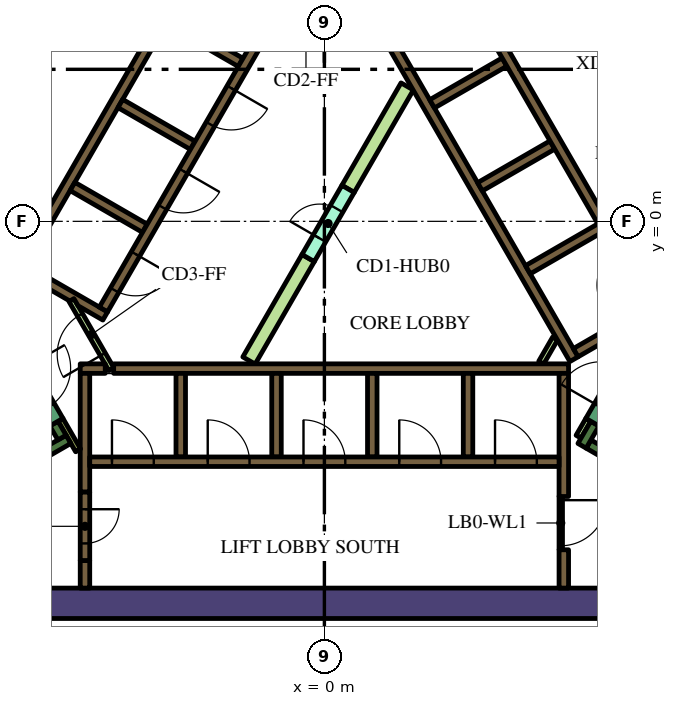
"""IFC4 building model, lengths in metres.
Left out: names, types, materials, properties, quantities, classifications, styles, units other than length and angle.
Written with IfcOpenShell. Run it as: python <this file> out.ifc"""

import sys

from ifc_helpers import new_model, si_unit, direction, frame, frame_2d, origin, place, context, subcontext, project, spatial, polyline, rectangle, outline, extrude, element, fill, save


model = new_model("IFC4")
c1 = context("Model", 3, precision=1e-05, world=origin(), true_north=direction((0.0, 1.0)))
c2 = subcontext(c1, "Body", "Model", "MODEL_VIEW")
j1 = project(units=[si_unit("LENGTHUNIT", "METRE"), si_unit("PLANEANGLEUNIT", "RADIAN")], contexts=[c1])
p1 = place(None, origin())
s1 = spatial("IfcSite", under=j1, at=p1, CompositionType="ELEMENT")
p2 = place(p1, origin())
s2 = spatial("IfcBuilding", under=s1, at=p2, CompositionType="ELEMENT")
p3 = place(p2, frame((0.0, 0.0, 179.4)))
s3 = spatial("IfcBuildingStorey", under=s2, at=p3, CompositionType="ELEMENT", Elevation=179.4)
p4 = place(p3, frame((-13.378, -10.05, 0.0), z_axis=(0.0, 0.0, 1.0), x_axis=(1.0, 0.0, 0.0)))
e1 = element("IfcWall", 1, at=p4, inside=s3, PredefinedType="SOLIDWALL", context=c2, shape_type="SweptSolid", body=[
    extrude(rectangle(XDim=22.282, YDim=0.8, at=frame_2d((11.141, 0.0))), origin(), (0.0, 0.0, 1.0), 4.2),
])
p5 = place(p3, frame((-12.668, -1.842, 0.0), z_axis=(0.0, 0.0, 1.0), x_axis=(0.500003640647, 0.866023301845, 0.0)))
e2 = element("IfcWall", 2, at=p5, inside=s3, PredefinedType="SOLIDWALL", context=c2, shape_type="SweptSolid", body=[
    extrude(rectangle(XDim=15.858, YDim=0.8, at=frame_2d((7.929, 0.0))), origin(), (0.0, 0.0, 1.0), 4.2),
])
p6 = place(p3, frame((12.84, -9.261, 0.0), z_axis=(0.0, 0.0, 1.0), x_axis=(-0.866013990052, 0.500019768644, 0.0)))
e3 = element("IfcWall", 3, at=p6, inside=s3, PredefinedType="SOLIDWALL", context=c2, shape_type="SweptSolid", body=[
    extrude(rectangle(XDim=6.8, YDim=0.25, at=frame_2d((3.4, 0.0))), origin(), (0.0, 0.0, 1.0), 4.2),
])
p7 = place(p3, frame((6.78, -5.906, 0.0), z_axis=(0.0, 0.0, 1.0), x_axis=(0.500223362819, 0.865896406789, 0.0)))
e4 = element("IfcWall", 4, at=p7, inside=s3, PredefinedType="SOLIDWALL", context=c2, shape_type="SweptSolid", body=[
    extrude(rectangle(XDim=0.675, YDim=0.25, at=frame_2d((0.337, 0.0))), origin(), (0.0, 0.0, 1.0), 4.2),
])
p8 = place(p3, frame((-12.84, -9.261, 0.0), z_axis=(0.0, 0.0, 1.0), x_axis=(0.866016039709, 0.500016218704, 0.0)))
e5 = element("IfcWall", 5, at=p8, inside=s3, PredefinedType="SOLIDWALL", context=c2, shape_type="SweptSolid", body=[
    extrude(rectangle(XDim=7.05, YDim=0.25, at=frame_2d((3.525, 0.0))), origin(), (0.0, 0.0, 1.0), 4.2),
])
p9 = place(p3, frame((-6.905, -5.69, 0.0), z_axis=(0.0, 0.0, 1.0), x_axis=(-0.500402024738, 0.865793170242, 0.0)))
e6 = element("IfcWall", 6, at=p9, inside=s3, PredefinedType="SOLIDWALL", context=c2, shape_type="SweptSolid", body=[
    extrude(rectangle(XDim=0.425, YDim=0.25, at=frame_2d((0.212, 0.0))), origin(), (0.0, 0.0, 1.0), 4.2),
])
p10 = place(p3, frame((-6.3, -8.925, 0.0), z_axis=(0.0, 0.0, 1.0), x_axis=(0.0, -1.0, 0.0)))
e7 = element("IfcWall", 7, at=p10, inside=s3, PredefinedType="SOLIDWALL", context=c2, shape_type="SweptSolid", body=[
    extrude(rectangle(XDim=0.725, YDim=0.25, at=frame_2d((0.363, 0.0))), origin(), (0.0, 0.0, 1.0), 4.2),
])
p11 = place(p3, frame((-5.545, -3.875, 0.0), z_axis=(0.0, 0.0, 1.0), x_axis=(1.0, 0.0, 0.0)))
e8 = element("IfcWall", 8, at=p11, inside=s3, PredefinedType="SOLIDWALL", context=c2, shape_type="SweptSolid", body=[
    extrude(rectangle(XDim=11.97, YDim=0.25, at=frame_2d((5.985, 0.0))), origin(), (0.0, 0.0, 1.0), 4.2),
])
p12 = place(p3, frame((-6.425, -3.875, 0.0), z_axis=(0.0, 0.0, 1.0), x_axis=(1.0, 0.0, 0.0)))
e9 = element("IfcWall", 9, at=p12, inside=s3, PredefinedType="SOLIDWALL", context=c2, shape_type="SweptSolid", body=[
    extrude(rectangle(XDim=0.658, YDim=0.25, at=frame_2d((0.329, 0.0))), origin(), (0.0, 0.0, 1.0), 4.2),
])
p13 = place(p3, frame((6.3, -7.24, 0.0), z_axis=(0.0, 0.0, 1.0), x_axis=(0.0, 1.0, 0.0)))
e10 = element("IfcWall", 10, at=p13, inside=s3, PredefinedType="SOLIDWALL", context=c2, shape_type="SweptSolid", body=[
    extrude(rectangle(XDim=3.24, YDim=0.25, at=frame_2d((1.62, 0.0))), origin(), (0.0, 0.0, 1.0), 4.2),
])
p14 = place(p3, frame((6.3, -9.65, 0.0), z_axis=(0.0, 0.0, 1.0), x_axis=(0.0, 1.0, 0.0)))
e11 = element("IfcWall", 11, at=p14, inside=s3, PredefinedType="SOLIDWALL", context=c2, shape_type="SweptSolid", body=[
    extrude(rectangle(XDim=1.008, YDim=0.25, at=frame_2d((0.504, 0.0))), origin(), (0.0, 0.0, 1.0), 4.2),
])
for number, where, z_axis, x_axis in (
    (12, (3.78, -4.0, 0.0), (0.0, 0.0, 1.0), (0.0, -1.0, 0.0)),
    (13, (1.26, -4.0, 0.0), (0.0, 0.0, 1.0), (0.0, -1.0, 0.0)),
    (14, (-1.26, -4.0, 0.0), (0.0, 0.0, 1.0), (0.0, -1.0, 0.0)),
    (15, (-3.78, -4.0, 0.0), (0.0, 0.0, 1.0), (0.0, -1.0, 0.0)),
):
    element("IfcWall", number, at=place(p3, frame(where, z_axis=z_axis, x_axis=x_axis)), inside=s3, PredefinedType="SOLIDWALL", context=c2, shape_type="SweptSolid", body=[
        extrude(rectangle(XDim=2.2, YDim=0.25, at=frame_2d((1.1, 0.0))), origin(), (0.0, 0.0, 1.0), 4.2),
    ])
p15 = place(p3, frame((-6.3, -7.125, 0.0), z_axis=(0.0, 0.0, 1.0), x_axis=(0.0, 1.0, 0.0)))
e16 = element("IfcWall", 16, at=p15, inside=s3, PredefinedType="SOLIDWALL", context=c2, shape_type="SweptSolid", body=[
    extrude(rectangle(XDim=3.125, YDim=0.25, at=frame_2d((1.562, 0.0))), origin(), (0.0, 0.0, 1.0), 4.2),
])
p16 = place(p3, frame((6.568, -3.627, 0.0), z_axis=(0.0, 0.0, 1.0), x_axis=(-0.499999455981, 0.866025717874, 0.0)))
e17 = element("IfcWall", 17, at=p16, inside=s3, PredefinedType="SOLIDWALL", context=c2, shape_type="SweptSolid", body=[
    extrude(rectangle(XDim=11.978, YDim=0.25, at=frame_2d((5.989, 0.0))), origin(), (0.0, 0.0, 1.0), 4.2),
])
for number, where, z_axis, x_axis in (
    (18, (2.834, 3.091, 0.0), (0.0, 0.0, 1.0), (0.866, 0.5, 0.0)),
    (19, (4.094, 0.909, 0.0), (0.0, 0.0, 1.0), (0.866, 0.5, 0.0)),
    (20, (5.354, -1.274, 0.0), (0.0, 0.0, 1.0), (0.866, 0.5, 0.0)),
):
    element("IfcWall", number, at=place(p3, frame(where, z_axis=z_axis, x_axis=x_axis)), inside=s3, PredefinedType="SOLIDWALL", context=c2, shape_type="SweptSolid", body=[
        extrude(rectangle(XDim=2.2, YDim=0.25, at=frame_2d((1.1, 0.0))), origin(), (0.0, 0.0, 1.0), 4.2),
    ])
p17 = place(p3, frame((6.614, -3.456, 0.0), z_axis=(0.0, 0.0, 1.0), x_axis=(0.866032512851, 0.499987686533, 0.0)))
e21 = element("IfcWall", 21, at=p17, inside=s3, PredefinedType="SOLIDWALL", context=c2, shape_type="SweptSolid", body=[
    extrude(rectangle(XDim=2.975, YDim=0.25, at=frame_2d((1.487, 0.0))), origin(), (0.0, 0.0, 1.0), 4.2),
])
p18 = place(p3, frame((-8.06, -1.311, 0.0), z_axis=(0.0, 0.0, 1.0), x_axis=(0.50000273126, 0.866023826885, 0.0)))
e22 = element("IfcWall", 22, at=p18, inside=s3, PredefinedType="SOLIDWALL", context=c2, shape_type="SweptSolid", body=[
    extrude(rectangle(XDim=10.33, YDim=0.25, at=frame_2d((5.165, 0.0))), origin(), (0.0, 0.0, 1.0), 4.2),
])
for number, where, z_axis, x_axis in (
    (23, (-2.204, 4.182, 0.0), (0.0, 0.0, 1.0), (-0.866, 0.5, 0.0)),
    (24, (-5.369, 3.1, 0.0), (0.0, 0.0, 1.0), (0.866, -0.5, 0.0)),
    (25, (-4.724, -0.182, 0.0), (0.0, 0.0, 1.0), (-0.866, 0.5, 0.0)),
):
    element("IfcWall", number, at=place(p3, frame(where, z_axis=z_axis, x_axis=x_axis)), inside=s3, PredefinedType="SOLIDWALL", context=c2, shape_type="SweptSolid", body=[
        extrude(rectangle(XDim=2.2, YDim=0.25, at=frame_2d((1.1, 0.0))), origin(), (0.0, 0.0, 1.0), 4.2),
    ])
p19 = place(p3, origin())
e26 = element("IfcWall", 26, at=p19, inside=s3, PredefinedType="SOLIDWALL", context=c2, shape_type="SweptSolid", body=[
    extrude(outline(polyline([(-5.922, -2.257), (-5.922, -2.257), (-5.705, -2.382), (-5.83, -2.598), (-6.483, -2.221), (-6.591, -2.033), (-6.591, -2.033), (-6.7, -2.096), (-7.952, -1.373), (-7.827, -1.156), (-5.922, -2.257)])), origin(), (0.0, 0.0, 1.0), 4.2),
])
p20 = place(p3, frame((-6.48, -6.027, 0.0), z_axis=(0.0, 0.0, 1.0), x_axis=(-0.499927229454, 0.866067413802, 0.0)))
e27 = element("IfcWall", 27, at=p20, inside=s3, PredefinedType="PARTITIONING", context=c2, shape_type="SweptSolid", body=[
    extrude(rectangle(XDim=0.929, YDim=0.15, at=frame_2d((0.464, 0.0))), origin(), (0.0, 0.0, 1.0), 4.2),
])
p21 = place(p3, frame((6.945, -5.222, 0.0), z_axis=(0.0, 0.0, 1.0), x_axis=(-0.499818422106, -0.866130212453, 0.0)))
e28 = element("IfcWall", 28, at=p21, inside=s3, PredefinedType="PARTITIONING", context=c2, shape_type="SweptSolid", body=[
    extrude(rectangle(XDim=0.514, YDim=0.15, at=frame_2d((0.257, 0.0))), origin(), (0.0, 0.0, 1.0), 3.15),
])
p22 = place(p3, frame((5.705, -3.718, 0.0), z_axis=(0.0, 0.0, 1.0), x_axis=(0.499962090823, 0.866047289552, 0.0)))
e29 = element("IfcWall", 29, at=p22, inside=s3, PredefinedType="PARTITIONING", context=c2, shape_type="SweptSolid", body=[
    extrude(rectangle(XDim=0.735, YDim=0.15, at=frame_2d((0.367, 0.0))), origin(), (0.0, 0.0, 1.0), 3.15),
])
e30 = element("IfcWall", 30, at=p19, inside=s3, PredefinedType="PARTITIONING", context=c2, shape_type="SweptSolid", body=[
    extrude(outline(polyline([(2.017, 3.643), (2.342, 3.456), (0.785, 0.76), (0.46, 0.947), (2.017, 3.643)])), origin(), (0.0, 0.0, 1.0), 3.15),
])
e31 = element("IfcWall", 31, at=p19, inside=s3, PredefinedType="PARTITIONING", context=c2, shape_type="SweptSolid", body=[
    extrude(outline(polyline([(-0.59, -0.872), (-0.265, -1.059), (-1.822, -3.756), (-2.147, -3.568), (-0.59, -0.872)])), origin(), (0.0, 0.0, 1.0), 3.15),
])
p23 = place(p3, frame((-6.175, -6.325, 0.0), z_axis=(0.0, 0.0, 1.0), x_axis=(1.0, 0.0, 0.0)))
e32 = element("IfcWall", 32, at=p23, inside=s3, PredefinedType="SOLIDWALL", context=c2, shape_type="SweptSolid", body=[
    extrude(rectangle(XDim=12.35, YDim=0.25, at=frame_2d((6.175, 0.0))), origin(), (0.0, 0.0, 1.0), 4.2),
])
p24 = place(p23, frame((0.585, 0.0, 0.0)))
e33 = element("IfcOpeningElement", 33, at=p24, cuts=e32, PredefinedType="OPENING", context=c2, shape_type="SweptSolid", body=[
    extrude(rectangle(XDim=1.1, YDim=2.1, at=frame_2d((0.55, 1.05))), frame((0.0, 0.135, 0.0), z_axis=(0.0, -1.0, 0.0), x_axis=(1.0, 0.0, 0.0)), (0.0, 0.0, 1.0), 0.27),
])
p25 = place(p23, frame((3.105, 0.0, 0.0)))
e34 = element("IfcOpeningElement", 34, at=p25, cuts=e32, PredefinedType="OPENING", context=c2, shape_type="SweptSolid", body=[
    extrude(rectangle(XDim=1.1, YDim=2.1, at=frame_2d((0.55, 1.05))), frame((0.0, 0.135, 0.0), z_axis=(0.0, -1.0, 0.0), x_axis=(1.0, 0.0, 0.0)), (0.0, 0.0, 1.0), 0.27),
])
p26 = place(p23, frame((5.625, 0.0, 0.0)))
e35 = element("IfcOpeningElement", 35, at=p26, cuts=e32, PredefinedType="OPENING", context=c2, shape_type="SweptSolid", body=[
    extrude(rectangle(XDim=1.1, YDim=2.1, at=frame_2d((0.55, 1.05))), frame((0.0, 0.135, 0.0), z_axis=(0.0, -1.0, 0.0), x_axis=(1.0, 0.0, 0.0)), (0.0, 0.0, 1.0), 0.27),
])
p27 = place(p23, frame((8.145, 0.0, 0.0)))
e36 = element("IfcOpeningElement", 36, at=p27, cuts=e32, PredefinedType="OPENING", context=c2, shape_type="SweptSolid", body=[
    extrude(rectangle(XDim=1.1, YDim=2.1, at=frame_2d((0.55, 1.05))), frame((0.0, 0.135, 0.0), z_axis=(0.0, -1.0, 0.0), x_axis=(1.0, 0.0, 0.0)), (0.0, 0.0, 1.0), 0.27),
])
p28 = place(p23, frame((10.665, 0.0, 0.0)))
e37 = element("IfcOpeningElement", 37, at=p28, cuts=e32, PredefinedType="OPENING", context=c2, shape_type="SweptSolid", body=[
    extrude(rectangle(XDim=1.1, YDim=2.1, at=frame_2d((0.55, 1.05))), frame((0.0, 0.135, 0.0), z_axis=(0.0, -1.0, 0.0), x_axis=(1.0, 0.0, 0.0)), (0.0, 0.0, 1.0), 0.27),
])
p29 = place(p3, frame((8.565, -2.185, 0.0), z_axis=(0.0, 0.0, 1.0), x_axis=(-0.499997954832, 0.866026584559, 0.0)))
e38 = element("IfcWall", 38, at=p29, inside=s3, PredefinedType="SOLIDWALL", context=c2, shape_type="SweptSolid", body=[
    extrude(rectangle(XDim=12.35, YDim=0.25, at=frame_2d((6.175, 0.0))), origin(), (0.0, 0.0, 1.0), 4.2),
])
p30 = place(p29, frame((0.585, 0.0, 0.0)))
e39 = element("IfcOpeningElement", 39, at=p30, cuts=e38, PredefinedType="OPENING", context=c2, shape_type="SweptSolid", body=[
    extrude(rectangle(XDim=1.1, YDim=2.1, at=frame_2d((0.55, 1.05))), frame((0.0, 0.135, 0.0), z_axis=(0.0, -1.0, 0.0), x_axis=(1.0, 0.0, 0.0)), (0.0, 0.0, 1.0), 0.27),
])
p31 = place(p3, frame((-0.898, 6.194, 0.0), z_axis=(0.0, 0.0, 1.0), x_axis=(-0.499996202215, -0.866027596426, 0.0)))
e40 = element("IfcWall", 40, at=p31, inside=s3, PredefinedType="SOLIDWALL", context=c2, shape_type="SweptSolid", body=[
    extrude(rectangle(XDim=9.83, YDim=0.25, at=frame_2d((4.915, 0.0))), origin(), (0.0, 0.0, 1.0), 4.2),
])
p32 = place(p31, frame((0.585, 0.0, 0.0)))
e41 = element("IfcOpeningElement", 41, at=p32, cuts=e40, PredefinedType="OPENING", context=c2, shape_type="SweptSolid", body=[
    extrude(rectangle(XDim=1.1, YDim=2.1, at=frame_2d((0.55, 1.05))), frame((0.0, 0.135, 0.0), z_axis=(0.0, -1.0, 0.0), x_axis=(1.0, 0.0, 0.0)), (0.0, 0.0, 1.0), 0.27),
])
p33 = place(p31, frame((3.105, 0.0, 0.0)))
e42 = element("IfcOpeningElement", 42, at=p33, cuts=e40, PredefinedType="OPENING", context=c2, shape_type="SweptSolid", body=[
    extrude(rectangle(XDim=1.1, YDim=2.1, at=frame_2d((0.55, 1.05))), frame((0.0, 0.135, 0.0), z_axis=(0.0, -1.0, 0.0), x_axis=(1.0, 0.0, 0.0)), (0.0, 0.0, 1.0), 0.27),
])
p34 = place(p31, frame((5.625, 0.0, 0.0)))
e43 = element("IfcOpeningElement", 43, at=p34, cuts=e40, PredefinedType="OPENING", context=c2, shape_type="SweptSolid", body=[
    extrude(rectangle(XDim=1.1, YDim=2.1, at=frame_2d((0.55, 1.05))), frame((0.0, 0.135, 0.0), z_axis=(0.0, -1.0, 0.0), x_axis=(1.0, 0.0, 0.0)), (0.0, 0.0, 1.0), 0.27),
])
p35 = place(p31, frame((8.145, 0.0, 0.0)))
e44 = element("IfcOpeningElement", 44, at=p35, cuts=e40, PredefinedType="OPENING", context=c2, shape_type="SweptSolid", body=[
    extrude(rectangle(XDim=1.1, YDim=2.1, at=frame_2d((0.55, 1.05))), frame((0.0, 0.135, 0.0), z_axis=(0.0, -1.0, 0.0), x_axis=(1.0, 0.0, 0.0)), (0.0, 0.0, 1.0), 0.27),
])
p36 = place(p3, frame((7.053, -5.284, 0.0), z_axis=(0.0, 0.0, 1.0), x_axis=(0.500078061341, 0.865980330357, 0.0)))
e45 = element("IfcWall", 45, at=p36, inside=s3, PredefinedType="SOLIDWALL", context=c2, shape_type="SweptSolid", body=[
    extrude(rectangle(XDim=2.1, YDim=0.4, at=frame_2d((1.05, 0.0))), origin(), (0.0, 0.0, 1.0), 4.2),
])
p37 = place(p36, frame((0.45, 0.0, 0.0)))
e46 = element("IfcOpeningElement", 46, at=p37, cuts=e45, PredefinedType="OPENING", context=c2, shape_type="SweptSolid", body=[
    extrude(rectangle(XDim=1.2, YDim=2.1, at=frame_2d((0.6, 1.05))), frame((0.0, 0.21, 0.0), z_axis=(0.0, -1.0, 0.0), x_axis=(1.0, 0.0, 0.0)), (0.0, 0.0, 1.0), 0.42),
])
p38 = place(p3, frame((-8.103, -3.466, 0.0), z_axis=(0.0, 0.0, 1.0), x_axis=(0.500078061341, -0.865980330357, 0.0)))
e47 = element("IfcWall", 47, at=p38, inside=s3, PredefinedType="SOLIDWALL", context=c2, shape_type="SweptSolid", body=[
    extrude(rectangle(XDim=2.1, YDim=0.4, at=frame_2d((1.05, 0.0))), origin(), (0.0, 0.0, 1.0), 4.2),
])
p39 = place(p38, frame((0.45, 0.0, 0.0)))
e48 = element("IfcOpeningElement", 48, at=p39, cuts=e47, PredefinedType="OPENING", context=c2, shape_type="SweptSolid", body=[
    extrude(rectangle(XDim=1.2, YDim=2.1, at=frame_2d((0.6, 1.05))), frame((0.0, 0.21, 0.0), z_axis=(0.0, -1.0, 0.0), x_axis=(1.0, 0.0, 0.0)), (0.0, 0.0, 1.0), 0.42),
])
p40 = place(p3, frame((-6.3, -7.125, 0.0), z_axis=(0.0, 0.0, 1.0), x_axis=(0.0, -1.0, 0.0)))
e49 = element("IfcWall", 49, at=p40, inside=s3, PredefinedType="SOLIDWALL", context=c2, shape_type="SweptSolid", body=[
    extrude(rectangle(XDim=1.8, YDim=0.25, at=frame_2d((0.9, 0.0))), origin(), (0.0, 0.0, 1.0), 4.2),
])
p41 = place(p40, frame((0.45, 0.0, 0.0)))
e50 = element("IfcOpeningElement", 50, at=p41, cuts=e49, PredefinedType="OPENING", context=c2, shape_type="SweptSolid", body=[
    extrude(rectangle(XDim=0.9, YDim=2.1, at=frame_2d((0.45, 1.05))), frame((0.0, 0.135, 0.0), z_axis=(0.0, -1.0, 0.0), x_axis=(1.0, 0.0, 0.0)), (0.0, 0.0, 1.0), 0.27),
])
p42 = place(p3, frame((-0.427, -0.966, 0.0), z_axis=(0.0, 0.0, 1.0), x_axis=(0.49994051562, 0.866059744384, 0.0)))
e51 = element("IfcWall", 51, at=p42, inside=s3, PredefinedType="PARTITIONING", context=c2, shape_type="SweptSolid", body=[
    extrude(rectangle(XDim=2.1, YDim=0.375, at=frame_2d((1.05, 0.0))), origin(), (0.0, 0.0, 1.0), 3.15),
])
p43 = place(p42, frame((0.6, 0.0, 0.0)))
e52 = element("IfcOpeningElement", 52, at=p43, cuts=e51, PredefinedType="OPENING", context=c2, shape_type="SweptSolid", body=[
    extrude(rectangle(XDim=0.9, YDim=2.1, at=frame_2d((0.45, 1.05))), frame((0.0, 0.198, 0.0), z_axis=(0.0, -1.0, 0.0), x_axis=(1.0, 0.0, 0.0)), (0.0, 0.0, 1.0), 0.395),
])
p44 = place(p3, frame((-5.606, -3.89, 0.0), z_axis=(0.0, 0.0, 1.0), x_axis=(-0.500027713859, 0.866009402589, 0.0)))
e53 = element("IfcWall", 53, at=p44, inside=s3, PredefinedType="PARTITIONING", context=c2, shape_type="SweptSolid", body=[
    extrude(rectangle(XDim=2.1, YDim=0.15, at=frame_2d((1.05, 0.0))), origin(), (0.0, 0.0, 1.0), 3.15),
])
p45 = place(p44, frame((0.45, 0.0, 0.0)))
e54 = element("IfcOpeningElement", 54, at=p45, cuts=e53, PredefinedType="OPENING", context=c2, shape_type="SweptSolid", body=[
    extrude(rectangle(XDim=1.2, YDim=2.1, at=frame_2d((0.6, 1.05))), frame((0.0, 0.085, 0.0), z_axis=(0.0, -1.0, 0.0), x_axis=(1.0, 0.0, 0.0)), (0.0, 0.0, 1.0), 0.17),
])
p46 = place(p3, frame((6.22, -7.237, 0.0), z_axis=(0.0, 0.0, 1.0), x_axis=(0.0, -1.0, 0.0)))
e55 = element("IfcWall", 55, at=p46, inside=s3, PredefinedType="PARTITIONING", context=c2, shape_type="SweptSolid", body=[
    extrude(rectangle(XDim=1.4, YDim=0.09, at=frame_2d((0.7, 0.0))), origin(), (0.0, 0.0, 1.0), 3.15),
])
p47 = place(p46, frame((0.1, 0.0, 0.0)))
e56 = element("IfcOpeningElement", 56, at=p47, cuts=e55, PredefinedType="OPENING", context=c2, shape_type="SweptSolid", body=[
    extrude(rectangle(XDim=1.2, YDim=2.1, at=frame_2d((0.6, 1.05))), frame((0.0, 0.055, 0.0), z_axis=(0.0, -1.0, 0.0), x_axis=(1.0, 0.0, 0.0)), (0.0, 0.0, 1.0), 0.11),
])
p48 = place(p24, origin())
e57 = element("IfcDoor", 57, at=p48, inside=s3, OperationType="DOUBLE_DOOR_SLIDING", PredefinedType="DOOR", context=c2, shape_type="SweptSolid", body=[
    extrude(rectangle(XDim=1.1, YDim=2.1, at=frame_2d((0.55, 1.05))), frame((0.0, 0.025, 0.0), z_axis=(0.0, -1.0, 0.0), x_axis=(1.0, 0.0, 0.0)), (0.0, 0.0, 1.0), 0.05),
])
fill(e33, e57)
p49 = place(p25, origin())
e58 = element("IfcDoor", 58, at=p49, inside=s3, OperationType="DOUBLE_DOOR_SLIDING", PredefinedType="DOOR", context=c2, shape_type="SweptSolid", body=[
    extrude(rectangle(XDim=1.1, YDim=2.1, at=frame_2d((0.55, 1.05))), frame((0.0, 0.025, 0.0), z_axis=(0.0, -1.0, 0.0), x_axis=(1.0, 0.0, 0.0)), (0.0, 0.0, 1.0), 0.05),
])
fill(e34, e58)
p50 = place(p26, origin())
e59 = element("IfcDoor", 59, at=p50, inside=s3, OperationType="DOUBLE_DOOR_SLIDING", PredefinedType="DOOR", context=c2, shape_type="SweptSolid", body=[
    extrude(rectangle(XDim=1.1, YDim=2.1, at=frame_2d((0.55, 1.05))), frame((0.0, 0.025, 0.0), z_axis=(0.0, -1.0, 0.0), x_axis=(1.0, 0.0, 0.0)), (0.0, 0.0, 1.0), 0.05),
])
fill(e35, e59)
p51 = place(p27, origin())
e60 = element("IfcDoor", 60, at=p51, inside=s3, OperationType="DOUBLE_DOOR_SLIDING", PredefinedType="DOOR", context=c2, shape_type="SweptSolid", body=[
    extrude(rectangle(XDim=1.1, YDim=2.1, at=frame_2d((0.55, 1.05))), frame((0.0, 0.025, 0.0), z_axis=(0.0, -1.0, 0.0), x_axis=(1.0, 0.0, 0.0)), (0.0, 0.0, 1.0), 0.05),
])
fill(e36, e60)
p52 = place(p28, origin())
e61 = element("IfcDoor", 61, at=p52, inside=s3, OperationType="DOUBLE_DOOR_SLIDING", PredefinedType="DOOR", context=c2, shape_type="SweptSolid", body=[
    extrude(rectangle(XDim=1.1, YDim=2.1, at=frame_2d((0.55, 1.05))), frame((0.0, 0.025, 0.0), z_axis=(0.0, -1.0, 0.0), x_axis=(1.0, 0.0, 0.0)), (0.0, 0.0, 1.0), 0.05),
])
fill(e37, e61)
p53 = place(p33, origin())
e62 = element("IfcDoor", 62, at=p53, inside=s3, OperationType="DOUBLE_DOOR_SLIDING", PredefinedType="DOOR", context=c2, shape_type="SweptSolid", body=[
    extrude(rectangle(XDim=1.1, YDim=2.1, at=frame_2d((0.55, 1.05))), frame((0.0, 0.025, 0.0), z_axis=(0.0, -1.0, 0.0), x_axis=(1.0, 0.0, 0.0)), (0.0, 0.0, 1.0), 0.05),
])
fill(e42, e62)
p54 = place(p34, origin())
e63 = element("IfcDoor", 63, at=p54, inside=s3, OperationType="DOUBLE_DOOR_SLIDING", PredefinedType="DOOR", context=c2, shape_type="SweptSolid", body=[
    extrude(rectangle(XDim=1.1, YDim=2.1, at=frame_2d((0.55, 1.05))), frame((0.0, 0.025, 0.0), z_axis=(0.0, -1.0, 0.0), x_axis=(1.0, 0.0, 0.0)), (0.0, 0.0, 1.0), 0.05),
])
fill(e43, e63)
p55 = place(p35, origin())
e64 = element("IfcDoor", 64, at=p55, inside=s3, OperationType="DOUBLE_DOOR_SLIDING", PredefinedType="DOOR", context=c2, shape_type="SweptSolid", body=[
    extrude(rectangle(XDim=1.1, YDim=2.1, at=frame_2d((0.55, 1.05))), frame((0.0, 0.025, 0.0), z_axis=(0.0, -1.0, 0.0), x_axis=(1.0, 0.0, 0.0)), (0.0, 0.0, 1.0), 0.05),
])
fill(e44, e64)
p56 = place(p41, origin())
e65 = element("IfcDoor", 65, at=p56, inside=s3, OperationType="SINGLE_SWING_LEFT", PredefinedType="DOOR", context=c2, shape_type="SweptSolid", body=[
    extrude(rectangle(XDim=0.9, YDim=2.1, at=frame_2d((0.45, 1.05))), frame((0.0, 0.025, 0.0), z_axis=(0.0, -1.0, 0.0), x_axis=(1.0, 0.0, 0.0)), (0.0, 0.0, 1.0), 0.05),
])
fill(e50, e65)
p57 = place(p43, origin())
e66 = element("IfcDoor", 66, at=p57, inside=s3, OperationType="SINGLE_SWING_LEFT", PredefinedType="DOOR", context=c2, shape_type="SweptSolid", body=[
    extrude(rectangle(XDim=0.9, YDim=2.1, at=frame_2d((0.45, 1.05))), frame((0.0, 0.025, 0.0), z_axis=(0.0, -1.0, 0.0), x_axis=(1.0, 0.0, 0.0)), (0.0, 0.0, 1.0), 0.05),
])
fill(e52, e66)
p58 = place(p45, origin())
e67 = element("IfcDoor", 67, at=p58, inside=s3, OperationType="SINGLE_SWING_LEFT", PredefinedType="DOOR", context=c2, shape_type="SweptSolid", body=[
    extrude(rectangle(XDim=1.2, YDim=2.1, at=frame_2d((0.6, 1.05))), frame((0.0, 0.025, 0.0), z_axis=(0.0, -1.0, 0.0), x_axis=(1.0, 0.0, 0.0)), (0.0, 0.0, 1.0), 0.05),
])
fill(e54, e67)
p59 = place(p47, origin())
e68 = element("IfcDoor", 68, at=p59, inside=s3, OperationType="SINGLE_SWING_LEFT", PredefinedType="DOOR", context=c2, shape_type="SweptSolid", body=[
    extrude(rectangle(XDim=1.2, YDim=2.1, at=frame_2d((0.6, 1.05))), frame((0.0, 0.025, 0.0), z_axis=(0.0, -1.0, 0.0), x_axis=(1.0, 0.0, 0.0)), (0.0, 0.0, 1.0), 0.05),
])
fill(e56, e68)
save(model, sys.argv[1])
